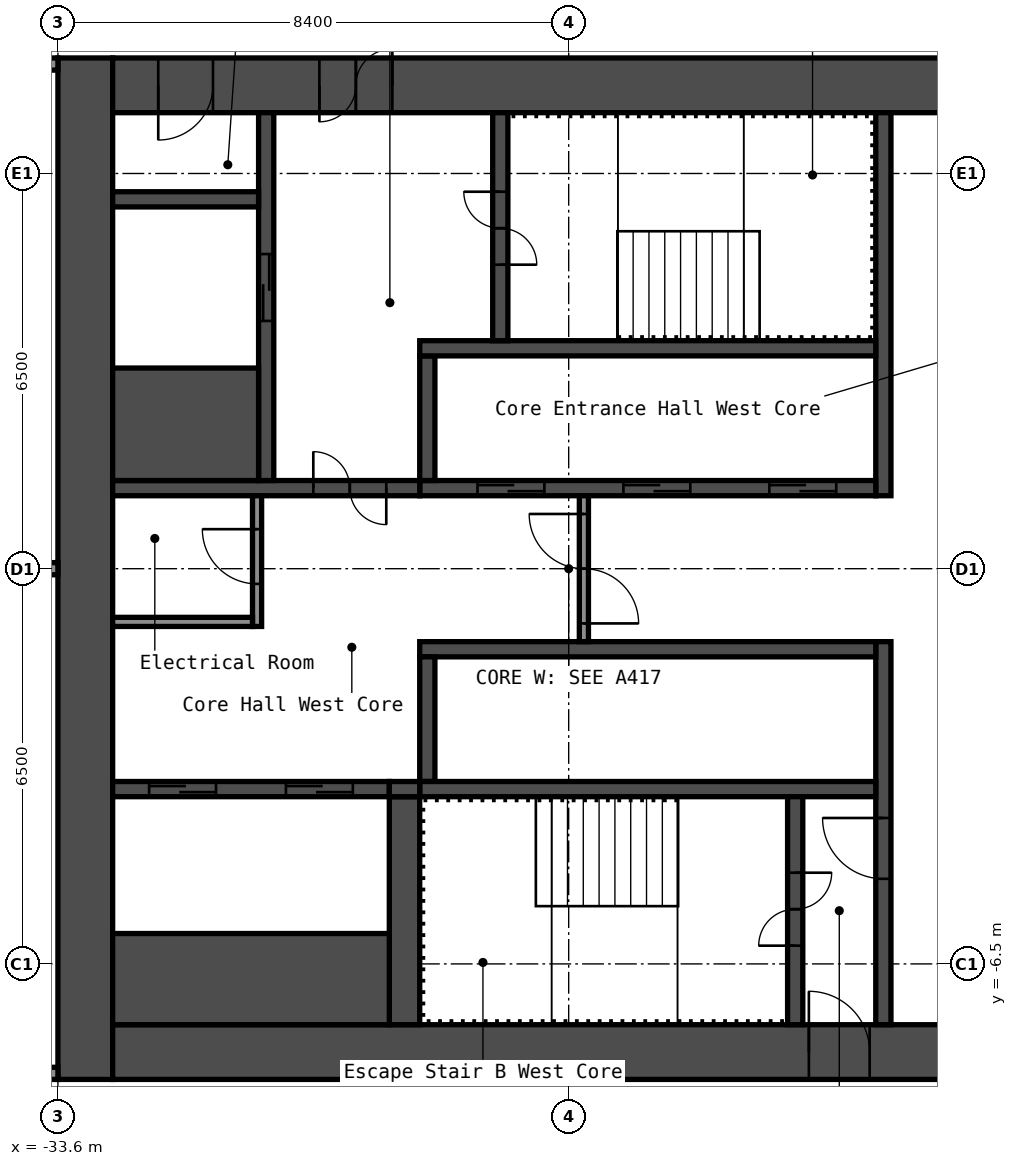
"""IFC4 building model, lengths in metres.
Left out: names, types, materials, properties, quantities, classifications, styles, units other than length and angle.
Written with IfcOpenShell. Run it as: python <this file> out.ifc"""

import sys

from ifc_helpers import new_model, si_unit, direction, frame, frame_2d, origin, place, context, subcontext, project, spatial, rectangle, extrude, element, fill, save


model = new_model("IFC4")
c1 = context("Model", 3, precision=1e-05, world=origin(), true_north=direction((0.0, 1.0)))
c2 = subcontext(c1, "Body", "Model", "MODEL_VIEW")
j1 = project(units=[si_unit("LENGTHUNIT", "METRE"), si_unit("PLANEANGLEUNIT", "RADIAN")], contexts=[c1])
p1 = place(None, origin())
s1 = spatial("IfcSite", under=j1, at=p1, CompositionType="ELEMENT")
p2 = place(p1, origin())
s2 = spatial("IfcBuilding", under=s1, at=p2, CompositionType="ELEMENT")
p3 = place(p2, frame((0.0, 0.0, 117.0)))
s3 = spatial("IfcBuildingStorey", under=s2, at=p3, CompositionType="ELEMENT", Elevation=117.0)
p4 = place(p3, frame((-33.15, -8.4, 0.0), z_axis=(0.0, 0.0, 1.0), x_axis=(0.0, 1.0, 0.0)))
e1 = element("IfcWall", 1, at=p4, inside=s3, PredefinedType="SHEAR", context=c2, shape_type="SweptSolid", body=[
    extrude(rectangle(XDim=16.8, YDim=0.9, at=frame_2d((8.4, 0.0))), origin(), (0.0, 0.0, 1.0), 2.9),
])
p5 = place(p3, frame((-32.7, 7.95, 0.0), z_axis=(0.0, 0.0, 1.0), x_axis=(1.0, 0.0, 0.0)))
e2 = element("IfcWall", 2, at=p5, inside=s3, PredefinedType="SHEAR", context=c2, shape_type="SweptSolid", body=[
    extrude(rectangle(XDim=15.0, YDim=0.9, at=frame_2d((7.5, 0.0))), origin(), (0.0, 0.0, 1.0), 2.9),
])
p6 = place(p5, frame((3.4, 0.0, 0.0)))
e3 = element("IfcOpeningElement", 3, at=p6, cuts=e2, PredefinedType="OPENING", context=c2, shape_type="SweptSolid", body=[
    extrude(rectangle(XDim=1.2, YDim=2.1, at=frame_2d((0.6, 1.05))), frame((0.0, 0.46, 0.0), z_axis=(0.0, -1.0, 0.0), x_axis=(1.0, 0.0, 0.0)), (0.0, 0.0, 1.0), 0.92),
])
p7 = place(p5, frame((0.75, 0.0, 0.0)))
e4 = element("IfcOpeningElement", 4, at=p7, cuts=e2, PredefinedType="OPENING", context=c2, shape_type="SweptSolid", body=[
    extrude(rectangle(XDim=0.9, YDim=2.1, at=frame_2d((0.45, 1.05))), frame((0.0, 0.46, 0.0), z_axis=(0.0, -1.0, 0.0), x_axis=(1.0, 0.0, 0.0)), (0.0, 0.0, 1.0), 0.92),
])
p8 = place(p3, frame((-32.7, -7.95, 0.0), z_axis=(0.0, 0.0, 1.0), x_axis=(1.0, 0.0, 0.0)))
e5 = element("IfcWall", 5, at=p8, inside=s3, PredefinedType="SHEAR", context=c2, shape_type="SweptSolid", body=[
    extrude(rectangle(XDim=15.0, YDim=0.9, at=frame_2d((7.5, 0.0))), origin(), (0.0, 0.0, 1.0), 2.9),
])
p9 = place(p8, frame((11.45, 0.0, 0.0)))
e6 = element("IfcOpeningElement", 6, at=p9, cuts=e5, PredefinedType="OPENING", context=c2, shape_type="SweptSolid", body=[
    extrude(rectangle(XDim=1.0, YDim=2.1, at=frame_2d((0.5, 1.05))), frame((0.0, 0.46, 0.0), z_axis=(0.0, -1.0, 0.0), x_axis=(1.0, 0.0, 0.0)), (0.0, 0.0, 1.0), 0.92),
])
p10 = place(p3, frame((-20.025, 1.2, 0.0), z_axis=(0.0, 0.0, 1.0), x_axis=(0.0, 1.0, 0.0)))
e7 = element("IfcWall", 7, at=p10, inside=s3, PredefinedType="SHEAR", context=c2, shape_type="SweptSolid", body=[
    extrude(rectangle(XDim=6.3, YDim=0.25, at=frame_2d((3.15, 0.0))), origin(), (0.0, 0.0, 1.0), 2.9),
])
p11 = place(p3, frame((-20.025, -7.5, 0.0), z_axis=(0.0, 0.0, 1.0), x_axis=(0.0, 1.0, 0.0)))
e8 = element("IfcWall", 8, at=p11, inside=s3, PredefinedType="SHEAR", context=c2, shape_type="SweptSolid", body=[
    extrude(rectangle(XDim=6.3, YDim=0.25, at=frame_2d((3.15, 0.0))), origin(), (0.0, 0.0, 1.0), 2.9),
])
p12 = place(p11, frame((2.4, 0.0, 0.0)))
e9 = element("IfcOpeningElement", 9, at=p12, cuts=e8, PredefinedType="OPENING", context=c2, shape_type="SweptSolid", body=[
    extrude(rectangle(XDim=1.0, YDim=2.1, at=frame_2d((0.5, 1.05))), frame((0.0, 0.135, 0.0), z_axis=(0.0, -1.0, 0.0), x_axis=(1.0, 0.0, 0.0)), (0.0, 0.0, 1.0), 0.27),
])
p13 = place(p3, frame((-27.65, 1.325, 0.0), z_axis=(0.0, 0.0, 1.0), x_axis=(1.0, 0.0, 0.0)))
e10 = element("IfcWall", 10, at=p13, inside=s3, PredefinedType="SHEAR", context=c2, shape_type="SweptSolid", body=[
    extrude(rectangle(XDim=7.5, YDim=0.25, at=frame_2d((3.75, 0.0))), origin(), (0.0, 0.0, 1.0), 2.9),
])
p14 = place(p13, frame((5.75, 0.0, 0.0)))
e11 = element("IfcOpeningElement", 11, at=p14, cuts=e10, PredefinedType="OPENING", context=c2, shape_type="SweptSolid", body=[
    extrude(rectangle(XDim=1.1, YDim=2.1, at=frame_2d((0.55, 1.05))), frame((0.0, 0.135, 0.0), z_axis=(0.0, -1.0, 0.0), x_axis=(1.0, 0.0, 0.0)), (0.0, 0.0, 1.0), 0.27),
])
p15 = place(p13, frame((3.35, 0.0, 0.0)))
e12 = element("IfcOpeningElement", 12, at=p15, cuts=e10, PredefinedType="OPENING", context=c2, shape_type="SweptSolid", body=[
    extrude(rectangle(XDim=1.1, YDim=2.1, at=frame_2d((0.55, 1.05))), frame((0.0, 0.135, 0.0), z_axis=(0.0, -1.0, 0.0), x_axis=(1.0, 0.0, 0.0)), (0.0, 0.0, 1.0), 0.27),
])
p16 = place(p13, frame((0.95, 0.0, 0.0)))
e13 = element("IfcOpeningElement", 13, at=p16, cuts=e10, PredefinedType="OPENING", context=c2, shape_type="SweptSolid", body=[
    extrude(rectangle(XDim=1.1, YDim=2.1, at=frame_2d((0.55, 1.05))), frame((0.0, 0.135, 0.0), z_axis=(0.0, -1.0, 0.0), x_axis=(1.0, 0.0, 0.0)), (0.0, 0.0, 1.0), 0.27),
])
p17 = place(p3, frame((-27.525, 1.45, 0.0), z_axis=(0.0, 0.0, 1.0), x_axis=(0.0, 1.0, 0.0)))
e14 = element("IfcWall", 14, at=p17, inside=s3, PredefinedType="SHEAR", context=c2, shape_type="SweptSolid", body=[
    extrude(rectangle(XDim=2.05, YDim=0.25, at=frame_2d((1.025, 0.0))), origin(), (0.0, 0.0, 1.0), 2.9),
])
p18 = place(p3, frame((-27.65, 3.625, 0.0), z_axis=(0.0, 0.0, 1.0), x_axis=(1.0, 0.0, 0.0)))
e15 = element("IfcWall", 15, at=p18, inside=s3, PredefinedType="SHEAR", context=c2, shape_type="SweptSolid", body=[
    extrude(rectangle(XDim=7.5, YDim=0.25, at=frame_2d((3.75, 0.0))), origin(), (0.0, 0.0, 1.0), 2.9),
])
p19 = place(p3, frame((-26.325, 3.75, 0.0), z_axis=(0.0, 0.0, 1.0), x_axis=(0.0, 1.0, 0.0)))
e16 = element("IfcWall", 16, at=p19, inside=s3, PredefinedType="SHEAR", context=c2, shape_type="SweptSolid", body=[
    extrude(rectangle(XDim=3.75, YDim=0.25, at=frame_2d((1.875, 0.0))), origin(), (0.0, 0.0, 1.0), 2.9),
])
p20 = place(p19, frame((1.25, 0.0, 0.0)))
e17 = element("IfcOpeningElement", 17, at=p20, cuts=e16, PredefinedType="OPENING", context=c2, shape_type="SweptSolid", body=[
    extrude(rectangle(XDim=1.2, YDim=2.1, at=frame_2d((0.6, 1.05))), frame((0.0, 0.135, 0.0), z_axis=(0.0, -1.0, 0.0), x_axis=(1.0, 0.0, 0.0)), (0.0, 0.0, 1.0), 0.27),
])
p21 = place(p3, frame((-32.7, 1.325, 0.0), z_axis=(0.0, 0.0, 1.0), x_axis=(1.0, 0.0, 0.0)))
e18 = element("IfcWall", 18, at=p21, inside=s3, PredefinedType="SHEAR", context=c2, shape_type="SweptSolid", body=[
    extrude(rectangle(XDim=5.05, YDim=0.25, at=frame_2d((2.525, 0.0))), origin(), (0.0, 0.0, 1.0), 2.9),
])
p22 = place(p21, frame((3.3, 0.0, 0.0)))
e19 = element("IfcOpeningElement", 19, at=p22, cuts=e18, PredefinedType="OPENING", context=c2, shape_type="SweptSolid", body=[
    extrude(rectangle(XDim=1.2, YDim=2.1, at=frame_2d((0.6, 1.05))), frame((0.0, 0.135, 0.0), z_axis=(0.0, -1.0, 0.0), x_axis=(1.0, 0.0, 0.0)), (0.0, 0.0, 1.0), 0.27),
])
p23 = place(p3, frame((-30.175, 1.45, 0.0), z_axis=(0.0, 0.0, 1.0), x_axis=(0.0, 1.0, 0.0)))
e20 = element("IfcWall", 20, at=p23, inside=s3, PredefinedType="SHEAR", context=c2, shape_type="SweptSolid", body=[
    extrude(rectangle(XDim=6.05, YDim=0.25, at=frame_2d((3.025, 0.0))), origin(), (0.0, 0.0, 1.0), 2.9),
])
p24 = place(p23, frame((2.625, 0.0, 0.0)))
e21 = element("IfcOpeningElement", 21, at=p24, cuts=e20, PredefinedType="OPENING", context=c2, shape_type="SweptSolid", body=[
    extrude(rectangle(XDim=1.1, YDim=2.1, at=frame_2d((0.55, 1.05))), frame((0.0, 0.135, 0.0), z_axis=(0.0, -1.0, 0.0), x_axis=(1.0, 0.0, 0.0)), (0.0, 0.0, 1.0), 0.27),
])
p25 = place(p3, frame((-32.7, 2.375, 0.0), z_axis=(0.0, 0.0, 1.0), x_axis=(1.0, 0.0, 0.0)))
e22 = element("IfcWall", 22, at=p25, inside=s3, PredefinedType="SHEAR", context=c2, shape_type="SweptSolid", body=[
    extrude(rectangle(XDim=2.4, YDim=1.85, at=frame_2d((1.2, 0.0))), origin(), (0.0, 0.0, 1.0), 2.9),
])
p26 = place(p3, frame((-32.7, 6.075, 0.0), z_axis=(0.0, 0.0, 1.0), x_axis=(1.0, 0.0, 0.0)))
e23 = element("IfcWall", 23, at=p26, inside=s3, PredefinedType="SHEAR", context=c2, shape_type="SweptSolid", body=[
    extrude(rectangle(XDim=2.4, YDim=0.25, at=frame_2d((1.2, 0.0))), origin(), (0.0, 0.0, 1.0), 2.9),
])
p27 = place(p3, frame((-27.65, -1.325, 0.0), z_axis=(0.0, 0.0, 1.0), x_axis=(1.0, 0.0, 0.0)))
e24 = element("IfcWall", 24, at=p27, inside=s3, PredefinedType="SHEAR", context=c2, shape_type="SweptSolid", body=[
    extrude(rectangle(XDim=7.5, YDim=0.25, at=frame_2d((3.75, 0.0))), origin(), (0.0, 0.0, 1.0), 2.9),
])
p28 = place(p3, frame((-27.525, -3.5, 0.0), z_axis=(0.0, 0.0, 1.0), x_axis=(0.0, 1.0, 0.0)))
e25 = element("IfcWall", 25, at=p28, inside=s3, PredefinedType="SHEAR", context=c2, shape_type="SweptSolid", body=[
    extrude(rectangle(XDim=2.05, YDim=0.25, at=frame_2d((1.025, 0.0))), origin(), (0.0, 0.0, 1.0), 2.9),
])
p29 = place(p3, frame((-27.65, -3.625, 0.0), z_axis=(0.0, 0.0, 1.0), x_axis=(1.0, 0.0, 0.0)))
e26 = element("IfcWall", 26, at=p29, inside=s3, PredefinedType="SHEAR", context=c2, shape_type="SweptSolid", body=[
    extrude(rectangle(XDim=7.5, YDim=0.25, at=frame_2d((3.75, 0.0))), origin(), (0.0, 0.0, 1.0), 2.9),
])
p30 = place(p3, frame((-21.475, -7.5, 0.0), z_axis=(0.0, 0.0, 1.0), x_axis=(0.0, 1.0, 0.0)))
e27 = element("IfcWall", 27, at=p30, inside=s3, PredefinedType="SHEAR", context=c2, shape_type="SweptSolid", body=[
    extrude(rectangle(XDim=3.75, YDim=0.25, at=frame_2d((1.875, 0.0))), origin(), (0.0, 0.0, 1.0), 2.9),
])
p31 = place(p30, frame((1.3, 0.0, 0.0)))
e28 = element("IfcOpeningElement", 28, at=p31, cuts=e27, PredefinedType="OPENING", context=c2, shape_type="SweptSolid", body=[
    extrude(rectangle(XDim=1.2, YDim=2.1, at=frame_2d((0.6, 1.05))), frame((0.0, 0.135, 0.0), z_axis=(0.0, -1.0, 0.0), x_axis=(1.0, 0.0, 0.0)), (0.0, 0.0, 1.0), 0.27),
])
p32 = place(p3, frame((-27.9, -7.5, 0.0), z_axis=(0.0, 0.0, 1.0), x_axis=(0.0, 1.0, 0.0)))
e29 = element("IfcWall", 29, at=p32, inside=s3, PredefinedType="SHEAR", context=c2, shape_type="SweptSolid", body=[
    extrude(rectangle(XDim=3.75, YDim=0.5, at=frame_2d((1.875, 0.0))), origin(), (0.0, 0.0, 1.0), 2.9),
])
p33 = place(p3, frame((-32.7, -3.625, 0.0), z_axis=(0.0, 0.0, 1.0), x_axis=(1.0, 0.0, 0.0)))
e30 = element("IfcWall", 30, at=p33, inside=s3, PredefinedType="SHEAR", context=c2, shape_type="SweptSolid", body=[
    extrude(rectangle(XDim=4.55, YDim=0.25, at=frame_2d((2.275, 0.0))), origin(), (0.0, 0.0, 1.0), 2.9),
])
p34 = place(p33, frame((2.85, 0.0, 0.0)))
e31 = element("IfcOpeningElement", 31, at=p34, cuts=e30, PredefinedType="OPENING", context=c2, shape_type="SweptSolid", body=[
    extrude(rectangle(XDim=1.1, YDim=2.1, at=frame_2d((0.55, 1.05))), frame((0.0, 0.135, 0.0), z_axis=(0.0, -1.0, 0.0), x_axis=(1.0, 0.0, 0.0)), (0.0, 0.0, 1.0), 0.27),
])
p35 = place(p33, frame((0.6, 0.0, 0.0)))
e32 = element("IfcOpeningElement", 32, at=p35, cuts=e30, PredefinedType="OPENING", context=c2, shape_type="SweptSolid", body=[
    extrude(rectangle(XDim=1.1, YDim=2.1, at=frame_2d((0.55, 1.05))), frame((0.0, 0.135, 0.0), z_axis=(0.0, -1.0, 0.0), x_axis=(1.0, 0.0, 0.0)), (0.0, 0.0, 1.0), 0.27),
])
p36 = place(p3, frame((-32.7, -6.75, 0.0), z_axis=(0.0, 0.0, 1.0), x_axis=(1.0, 0.0, 0.0)))
e33 = element("IfcWall", 33, at=p36, inside=s3, PredefinedType="SHEAR", context=c2, shape_type="SweptSolid", body=[
    extrude(rectangle(XDim=4.55, YDim=1.5, at=frame_2d((2.275, 0.0))), origin(), (0.0, 0.0, 1.0), 2.9),
])
p37 = place(p3, frame((-28.15, -3.625, 0.0), z_axis=(0.0, 0.0, 1.0), x_axis=(1.0, 0.0, 0.0)))
e34 = element("IfcWall", 34, at=p37, inside=s3, PredefinedType="SHEAR", context=c2, shape_type="SweptSolid", body=[
    extrude(rectangle(XDim=0.5, YDim=0.25, at=frame_2d((0.25, 0.0))), origin(), (0.0, 0.0, 1.0), 2.9),
])
p38 = place(p3, frame((-24.95, -1.2, 0.0), z_axis=(0.0, 0.0, 1.0), x_axis=(0.0, 1.0, 0.0)))
e35 = element("IfcWall", 35, at=p38, inside=s3, PredefinedType="PARTITIONING", context=c2, shape_type="SweptSolid", body=[
    extrude(rectangle(XDim=2.4, YDim=0.15, at=frame_2d((1.2, 0.0))), origin(), (0.0, 0.0, 1.0), 2.9),
])
p39 = place(p38, frame((0.3, 0.0, 0.0)))
e36 = element("IfcOpeningElement", 36, at=p39, cuts=e35, PredefinedType="OPENING", context=c2, shape_type="SweptSolid", body=[
    extrude(rectangle(XDim=1.8, YDim=2.1, at=frame_2d((0.9, 1.05))), frame((0.0, 0.085, 0.0), z_axis=(0.0, -1.0, 0.0), x_axis=(1.0, 0.0, 0.0)), (0.0, 0.0, 1.0), 0.17),
])
p40 = place(p3, frame((-30.325, -0.95, 0.0), z_axis=(0.0, 0.0, 1.0), x_axis=(0.0, 1.0, 0.0)))
e37 = element("IfcWall", 37, at=p40, inside=s3, PredefinedType="PARTITIONING", context=c2, shape_type="SweptSolid", body=[
    extrude(rectangle(XDim=2.15, YDim=0.15, at=frame_2d((1.075, 0.0))), origin(), (0.0, 0.0, 1.0), 2.9),
])
p41 = place(p40, frame((0.7, 0.0, 0.0)))
e38 = element("IfcOpeningElement", 38, at=p41, cuts=e37, PredefinedType="OPENING", context=c2, shape_type="SweptSolid", body=[
    extrude(rectangle(XDim=0.9, YDim=2.1, at=frame_2d((0.45, 1.05))), frame((0.0, 0.085, 0.0), z_axis=(0.0, -1.0, 0.0), x_axis=(1.0, 0.0, 0.0)), (0.0, 0.0, 1.0), 0.17),
])
p42 = place(p3, frame((-32.7, -0.875, 0.0), z_axis=(0.0, 0.0, 1.0), x_axis=(1.0, 0.0, 0.0)))
e39 = element("IfcWall", 39, at=p42, inside=s3, PredefinedType="PARTITIONING", context=c2, shape_type="SweptSolid", body=[
    extrude(rectangle(XDim=2.3, YDim=0.15, at=frame_2d((1.15, 0.0))), origin(), (0.0, 0.0, 1.0), 2.9),
])
p43 = place(p3, frame((-44.0, -8.3, 0.0), z_axis=(0.0, 0.0, 1.0), x_axis=(1.0, 0.0, 0.0)))
e40 = element("IfcWall", 40, at=p43, inside=s3, PredefinedType="PARTITIONING", context=c2, shape_type="SweptSolid", body=[
    extrude(rectangle(XDim=10.4, YDim=0.2, at=frame_2d((5.2, 0.0))), origin(), (0.0, 0.0, 1.0), 2.9),
])
p44 = place(p43, frame((4.57, 0.0, 0.0)))
e41 = element("IfcOpeningElement", 41, at=p44, cuts=e40, PredefinedType="OPENING", context=c2, shape_type="SweptSolid", body=[
    extrude(rectangle(XDim=0.9, YDim=2.1, at=frame_2d((0.45, 1.05))), frame((0.0, 0.11, 0.0), z_axis=(0.0, -1.0, 0.0), x_axis=(1.0, 0.0, 0.0)), (0.0, 0.0, 1.0), 0.22),
])
p45 = place(p43, frame((7.67, 0.0, 0.0)))
e42 = element("IfcOpeningElement", 42, at=p45, cuts=e40, PredefinedType="OPENING", context=c2, shape_type="SweptSolid", body=[
    extrude(rectangle(XDim=0.9, YDim=2.1, at=frame_2d((0.45, 1.05))), frame((0.0, 0.11, 0.0), z_axis=(0.0, -1.0, 0.0), x_axis=(1.0, 0.0, 0.0)), (0.0, 0.0, 1.0), 0.22),
])
p46 = place(p3, frame((-43.9, 0.0, 0.0), z_axis=(0.0, 0.0, 1.0), x_axis=(1.0, 0.0, 0.0)))
e43 = element("IfcWall", 43, at=p46, inside=s3, PredefinedType="PARTITIONING", context=c2, shape_type="SweptSolid", body=[
    extrude(rectangle(XDim=10.3, YDim=0.2, at=frame_2d((5.15, 0.0))), origin(), (0.0, 0.0, 1.0), 2.9),
])
p47 = place(p3, frame((-44.0, 8.3, 0.0), z_axis=(0.0, 0.0, 1.0), x_axis=(1.0, 0.0, 0.0)))
e44 = element("IfcWall", 44, at=p47, inside=s3, PredefinedType="PARTITIONING", context=c2, shape_type="SweptSolid", body=[
    extrude(rectangle(XDim=10.4, YDim=0.2, at=frame_2d((5.2, 0.0))), origin(), (0.0, 0.0, 1.0), 2.9),
])
p48 = place(p47, frame((4.2, 0.0, 0.0)))
e45 = element("IfcOpeningElement", 45, at=p48, cuts=e44, PredefinedType="OPENING", context=c2, shape_type="SweptSolid", body=[
    extrude(rectangle(XDim=1.6, YDim=2.1, at=frame_2d((0.8, 1.05))), frame((0.0, 0.11, 0.0), z_axis=(0.0, -1.0, 0.0), x_axis=(1.0, 0.0, 0.0)), (0.0, 0.0, 1.0), 0.22),
])
p49 = place(p6, origin())
e46 = element("IfcDoor", 46, at=p49, inside=s3, OperationType="DOUBLE_DOOR_SINGLE_SWING", PredefinedType="DOOR", context=c2, shape_type="SweptSolid", body=[
    extrude(rectangle(XDim=1.2, YDim=2.1, at=frame_2d((0.6, 1.05))), frame((0.0, 0.025, 0.0), z_axis=(0.0, -1.0, 0.0), x_axis=(1.0, 0.0, 0.0)), (0.0, 0.0, 1.0), 0.05),
])
fill(e3, e46)
p50 = place(p7, origin())
e47 = element("IfcDoor", 47, at=p50, inside=s3, OperationType="SINGLE_SWING_LEFT", PredefinedType="DOOR", context=c2, shape_type="SweptSolid", body=[
    extrude(rectangle(XDim=0.9, YDim=2.1, at=frame_2d((0.45, 1.05))), frame((0.0, 0.025, 0.0), z_axis=(0.0, -1.0, 0.0), x_axis=(1.0, 0.0, 0.0)), (0.0, 0.0, 1.0), 0.05),
])
fill(e4, e47)
p51 = place(p9, origin())
e48 = element("IfcDoor", 48, at=p51, inside=s3, OperationType="SINGLE_SWING_RIGHT", PredefinedType="DOOR", context=c2, shape_type="SweptSolid", body=[
    extrude(rectangle(XDim=1.0, YDim=2.1, at=frame_2d((0.5, 1.05))), frame((0.0, 0.025, 0.0), z_axis=(0.0, -1.0, 0.0), x_axis=(1.0, 0.0, 0.0)), (0.0, 0.0, 1.0), 0.05),
])
fill(e6, e48)
p52 = place(p20, origin())
e49 = element("IfcDoor", 49, at=p52, inside=s3, OperationType="DOUBLE_DOOR_SINGLE_SWING", PredefinedType="DOOR", context=c2, shape_type="SweptSolid", body=[
    extrude(rectangle(XDim=1.2, YDim=2.1, at=frame_2d((0.6, 1.05))), frame((0.0, 0.025, 0.0), z_axis=(0.0, -1.0, 0.0), x_axis=(1.0, 0.0, 0.0)), (0.0, 0.0, 1.0), 0.05),
])
fill(e17, e49)
p53 = place(p31, origin())
e50 = element("IfcDoor", 50, at=p53, inside=s3, OperationType="DOUBLE_DOOR_SINGLE_SWING", PredefinedType="DOOR", context=c2, shape_type="SweptSolid", body=[
    extrude(rectangle(XDim=1.2, YDim=2.1, at=frame_2d((0.6, 1.05))), frame((0.0, 0.025, 0.0), z_axis=(0.0, -1.0, 0.0), x_axis=(1.0, 0.0, 0.0)), (0.0, 0.0, 1.0), 0.05),
])
fill(e28, e50)
p54 = place(p12, origin())
e51 = element("IfcDoor", 51, at=p54, inside=s3, OperationType="SINGLE_SWING_LEFT", PredefinedType="DOOR", context=c2, shape_type="SweptSolid", body=[
    extrude(rectangle(XDim=1.0, YDim=2.1, at=frame_2d((0.5, 1.05))), frame((0.0, 0.025, 0.0), z_axis=(0.0, -1.0, 0.0), x_axis=(1.0, 0.0, 0.0)), (0.0, 0.0, 1.0), 0.05),
])
fill(e9, e51)
p55 = place(p22, origin())
e52 = element("IfcDoor", 52, at=p55, inside=s3, OperationType="DOUBLE_DOOR_SINGLE_SWING", PredefinedType="DOOR", context=c2, shape_type="SweptSolid", body=[
    extrude(rectangle(XDim=1.2, YDim=2.1, at=frame_2d((0.6, 1.05))), frame((0.0, 0.025, 0.0), z_axis=(0.0, -1.0, 0.0), x_axis=(1.0, 0.0, 0.0)), (0.0, 0.0, 1.0), 0.05),
])
fill(e19, e52)
p56 = place(p39, origin())
e53 = element("IfcDoor", 53, at=p56, inside=s3, OperationType="DOUBLE_DOOR_SINGLE_SWING", PredefinedType="DOOR", context=c2, shape_type="SweptSolid", body=[
    extrude(rectangle(XDim=1.8, YDim=2.1, at=frame_2d((0.9, 1.05))), frame((0.0, 0.025, 0.0), z_axis=(0.0, -1.0, 0.0), x_axis=(1.0, 0.0, 0.0)), (0.0, 0.0, 1.0), 0.05),
])
fill(e36, e53)
p57 = place(p41, origin())
e54 = element("IfcDoor", 54, at=p57, inside=s3, OperationType="SINGLE_SWING_LEFT", PredefinedType="DOOR", context=c2, shape_type="SweptSolid", body=[
    extrude(rectangle(XDim=0.9, YDim=2.1, at=frame_2d((0.45, 1.05))), frame((0.0, 0.025, 0.0), z_axis=(0.0, -1.0, 0.0), x_axis=(1.0, 0.0, 0.0)), (0.0, 0.0, 1.0), 0.05),
])
fill(e38, e54)
p58 = place(p14, origin())
e55 = element("IfcDoor", 55, at=p58, inside=s3, OperationType="DOUBLE_DOOR_SLIDING", PredefinedType="DOOR", context=c2, shape_type="SweptSolid", body=[
    extrude(rectangle(XDim=1.1, YDim=2.1, at=frame_2d((0.55, 1.05))), frame((0.0, 0.025, 0.0), z_axis=(0.0, -1.0, 0.0), x_axis=(1.0, 0.0, 0.0)), (0.0, 0.0, 1.0), 0.05),
])
fill(e11, e55)
p59 = place(p15, origin())
e56 = element("IfcDoor", 56, at=p59, inside=s3, OperationType="DOUBLE_DOOR_SLIDING", PredefinedType="DOOR", context=c2, shape_type="SweptSolid", body=[
    extrude(rectangle(XDim=1.1, YDim=2.1, at=frame_2d((0.55, 1.05))), frame((0.0, 0.025, 0.0), z_axis=(0.0, -1.0, 0.0), x_axis=(1.0, 0.0, 0.0)), (0.0, 0.0, 1.0), 0.05),
])
fill(e12, e56)
p60 = place(p16, origin())
e57 = element("IfcDoor", 57, at=p60, inside=s3, OperationType="DOUBLE_DOOR_SLIDING", PredefinedType="DOOR", context=c2, shape_type="SweptSolid", body=[
    extrude(rectangle(XDim=1.1, YDim=2.1, at=frame_2d((0.55, 1.05))), frame((0.0, 0.025, 0.0), z_axis=(0.0, -1.0, 0.0), x_axis=(1.0, 0.0, 0.0)), (0.0, 0.0, 1.0), 0.05),
])
fill(e13, e57)
p61 = place(p24, origin())
e58 = element("IfcDoor", 58, at=p61, inside=s3, OperationType="DOUBLE_DOOR_SLIDING", PredefinedType="DOOR", context=c2, shape_type="SweptSolid", body=[
    extrude(rectangle(XDim=1.1, YDim=2.1, at=frame_2d((0.55, 1.05))), frame((0.0, 0.025, 0.0), z_axis=(0.0, -1.0, 0.0), x_axis=(1.0, 0.0, 0.0)), (0.0, 0.0, 1.0), 0.05),
])
fill(e21, e58)
p62 = place(p34, origin())
e59 = element("IfcDoor", 59, at=p62, inside=s3, OperationType="DOUBLE_DOOR_SLIDING", PredefinedType="DOOR", context=c2, shape_type="SweptSolid", body=[
    extrude(rectangle(XDim=1.1, YDim=2.1, at=frame_2d((0.55, 1.05))), frame((0.0, 0.025, 0.0), z_axis=(0.0, -1.0, 0.0), x_axis=(1.0, 0.0, 0.0)), (0.0, 0.0, 1.0), 0.05),
])
fill(e31, e59)
p63 = place(p35, origin())
e60 = element("IfcDoor", 60, at=p63, inside=s3, OperationType="DOUBLE_DOOR_SLIDING", PredefinedType="DOOR", context=c2, shape_type="SweptSolid", body=[
    extrude(rectangle(XDim=1.1, YDim=2.1, at=frame_2d((0.55, 1.05))), frame((0.0, 0.025, 0.0), z_axis=(0.0, -1.0, 0.0), x_axis=(1.0, 0.0, 0.0)), (0.0, 0.0, 1.0), 0.05),
])
fill(e32, e60)
save(model, sys.argv[1])
